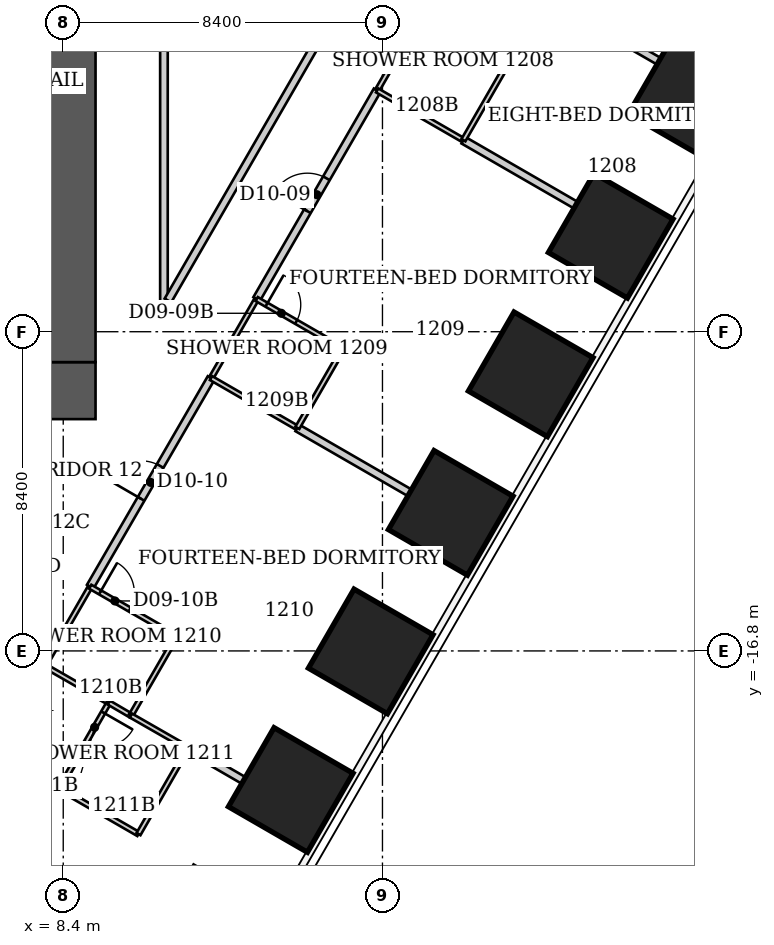
"""IFC4 building model, lengths in metres.
Left out: names, types, materials, properties, quantities, classifications, styles, units other than length and angle.
Written with IfcOpenShell. Run it as: python <this file> out.ifc"""

import sys

from ifc_helpers import new_model, si_unit, direction, frame, frame_2d, origin, origin_2d, place, context, subcontext, project, spatial, rectangle, extrude, clip, halfspace, element, fill, save


model = new_model("IFC4")
c1 = context("Model", 3, precision=1e-05, world=origin(), true_north=direction((0.0, 1.0)))
c2 = subcontext(c1, "Body", "Model", "MODEL_VIEW")
j1 = project(units=[si_unit("LENGTHUNIT", "METRE"), si_unit("PLANEANGLEUNIT", "RADIAN")], contexts=[c1])
p1 = place(None, origin())
s1 = spatial("IfcSite", under=j1, at=p1, CompositionType="ELEMENT")
p2 = place(p1, origin())
s2 = spatial("IfcBuilding", under=s1, at=p2, CompositionType="ELEMENT")
p3 = place(p2, frame((0.0, 0.0, 53.4)))
s3 = spatial("IfcBuildingStorey", under=s2, at=p3, CompositionType="ELEMENT", Elevation=53.4)
p4 = place(p3, frame((24.911, -2.23, 0.0), z_axis=(0.0, 0.0, 1.0), x_axis=(0.866025403784, -0.5, 0.0)))
e1 = element("IfcColumn", 1, at=p4, inside=s3, PredefinedType="COLUMN", context=c2, shape_type="SweptSolid", body=[
    clip(extrude(rectangle(XDim=2.4, YDim=2.4, at=origin_2d()), origin(), (0.0, 0.0, 1.0), 3.736), halfspace(frame((0.0, 0.0, 3.64)), False)),
])
p5 = place(p3, frame((22.806, -5.875, 0.0), z_axis=(0.0, 0.0, 1.0), x_axis=(0.866025403784, -0.5, 0.0)))
e2 = element("IfcColumn", 2, at=p5, inside=s3, PredefinedType="COLUMN", context=c2, shape_type="SweptSolid", body=[
    clip(extrude(rectangle(XDim=2.4, YDim=2.4, at=origin_2d()), origin(), (0.0, 0.0, 1.0), 3.744), halfspace(frame((0.0, 0.0, 3.64)), False)),
])
for number, where, z_axis, x_axis in (
    (3, (20.701, -9.521, 0.0), (0.0, 0.0, 1.0), (0.866, -0.5, 0.0)),
    (4, (18.596, -13.167, 0.0), (0.0, 0.0, 1.0), (0.866, -0.5, 0.0)),
):
    element("IfcColumn", number, at=place(p3, frame(where, z_axis=z_axis, x_axis=x_axis)), inside=s3, PredefinedType="COLUMN", context=c2, shape_type="SweptSolid", body=[
        clip(extrude(rectangle(XDim=2.4, YDim=2.4, at=origin_2d()), origin(), (0.0, 0.0, 1.0), 3.752), halfspace(frame((0.0, 0.0, 3.64)), False)),
    ])
p6 = place(p3, frame((16.491, -16.813, 0.0), z_axis=(0.0, 0.0, 1.0), x_axis=(0.866025403784, -0.5, 0.0)))
e5 = element("IfcColumn", 5, at=p6, inside=s3, PredefinedType="COLUMN", context=c2, shape_type="SweptSolid", body=[
    clip(extrude(rectangle(XDim=2.4, YDim=2.4, at=origin_2d()), origin(), (0.0, 0.0, 1.0), 3.744), halfspace(frame((0.0, 0.0, 3.64)), False)),
])
p7 = place(p3, frame((14.387, -20.459, 0.0), z_axis=(0.0, 0.0, 1.0), x_axis=(0.866025403784, -0.5, 0.0)))
e6 = element("IfcColumn", 6, at=p7, inside=s3, PredefinedType="COLUMN", context=c2, shape_type="SweptSolid", body=[
    clip(extrude(rectangle(XDim=2.4, YDim=2.4, at=origin_2d()), origin(), (0.0, 0.0, 1.0), 3.736), halfspace(frame((0.0, 0.0, 3.64)), False)),
])
p8 = place(p3, frame((-9.25, -9.95, 0.0), z_axis=(0.0, 0.0, 1.0), x_axis=(1.0, 0.0, 0.0)))
e7 = element("IfcWall", 7, at=p8, inside=s3, PredefinedType="SHEAR", context=c2, shape_type="SweptSolid", body=[
    extrude(rectangle(XDim=18.5, YDim=1.5, at=frame_2d((9.25, 0.0))), origin(), (0.0, 0.0, 1.0), 3.8),
])
p9 = place(p8, frame((2.137, 0.0, 0.0)))
e8 = element("IfcOpeningElement", 8, at=p9, cuts=e7, PredefinedType="OPENING", context=c2, shape_type="SweptSolid", body=[
    extrude(rectangle(XDim=1.1, YDim=2.1, at=frame_2d((0.55, 1.05))), frame((0.0, 0.75, 0.0), z_axis=(0.0, -1.0, 0.0), x_axis=(1.0, 0.0, 0.0)), (0.0, 0.0, 1.0), 1.5),
])
p10 = place(p8, frame((4.762, 0.0, 0.0)))
e9 = element("IfcOpeningElement", 9, at=p10, cuts=e7, PredefinedType="OPENING", context=c2, shape_type="SweptSolid", body=[
    extrude(rectangle(XDim=1.1, YDim=2.1, at=frame_2d((0.55, 1.05))), frame((0.0, 0.75, 0.0), z_axis=(0.0, -1.0, 0.0), x_axis=(1.0, 0.0, 0.0)), (0.0, 0.0, 1.0), 1.5),
])
p11 = place(p8, frame((7.387, 0.0, 0.0)))
e10 = element("IfcOpeningElement", 10, at=p11, cuts=e7, PredefinedType="OPENING", context=c2, shape_type="SweptSolid", body=[
    extrude(rectangle(XDim=1.1, YDim=2.1, at=frame_2d((0.55, 1.05))), frame((0.0, 0.75, 0.0), z_axis=(0.0, -1.0, 0.0), x_axis=(1.0, 0.0, 0.0)), (0.0, 0.0, 1.0), 1.5),
])
p12 = place(p3, frame((8.5, -9.2, 0.0), z_axis=(0.0, 0.0, 1.0), x_axis=(0.0, 1.0, 0.0)))
e11 = element("IfcWall", 11, at=p12, inside=s3, PredefinedType="SHEAR", context=c2, shape_type="SweptSolid", body=[
    extrude(rectangle(XDim=15.3, YDim=1.5, at=frame_2d((7.65, 0.0))), origin(), (0.0, 0.0, 1.0), 3.8),
])
p13 = place(p12, frame((10.7, 0.0, 0.0)))
e12 = element("IfcOpeningElement", 12, at=p13, cuts=e11, PredefinedType="OPENING", context=c2, shape_type="SweptSolid", body=[
    extrude(rectangle(XDim=1.2, YDim=2.2, at=frame_2d((0.6, 1.1))), frame((0.0, 0.75, 0.0), z_axis=(0.0, -1.0, 0.0), x_axis=(1.0, 0.0, 0.0)), (0.0, 0.0, 1.0), 1.5),
])
p14 = place(p3, frame((7.57, -21.86, 0.0), z_axis=(0.0, 0.0, 1.0), x_axis=(0.327706459026, -0.944779591605, 0.0)))
e13 = element("IfcWall", 13, at=p14, inside=s3, PredefinedType="PARTITIONING", context=c2, shape_type="SweptSolid", body=[
    extrude(rectangle(XDim=2.35, YDim=0.12, at=frame_2d((1.175, 0.0))), origin(), (0.0, 0.0, 1.0), 3.64),
])
p15 = place(p3, frame((7.91, -17.19, 0.0), z_axis=(0.0, 0.0, 1.0), x_axis=(0.499737123639, 0.866177122335, 0.0)))
e14 = element("IfcWall", 14, at=p15, inside=s3, PredefinedType="PARTITIONING", context=c2, shape_type="SweptSolid", body=[
    extrude(rectangle(XDim=2.401, YDim=0.12, at=frame_2d((1.201, 0.0))), origin(), (0.0, 0.0, 1.0), 3.64),
])
p16 = place(p3, frame((7.91, -17.19, 0.0), z_axis=(0.0, 0.0, 1.0), x_axis=(0.8673242112, -0.497743621421, 0.0)))
e15 = element("IfcWall", 15, at=p16, inside=s3, PredefinedType="PARTITIONING", context=c2, shape_type="SweptSolid", body=[
    extrude(rectangle(XDim=1.949, YDim=0.12, at=frame_2d((0.974, 0.0))), origin(), (0.0, 0.0, 1.0), 3.64),
])
p17 = place(p3, frame((8.3, -20.42, 0.0), z_axis=(0.0, 0.0, 1.0), x_axis=(0.866177122335, -0.499737123639, 0.0)))
e16 = element("IfcWall", 16, at=p17, inside=s3, PredefinedType="PARTITIONING", context=c2, shape_type="SweptSolid", body=[
    extrude(rectangle(XDim=2.401, YDim=0.12, at=frame_2d((1.201, 0.0))), origin(), (0.0, 0.0, 1.0), 3.64),
])
p18 = place(p3, frame((9.11, -15.11, 0.0), z_axis=(0.0, 0.0, 1.0), x_axis=(0.50119856319, 0.865332306259, 0.0)))
e17 = element("IfcWall", 17, at=p18, inside=s3, PredefinedType="PARTITIONING", context=c2, shape_type="SweptSolid", body=[
    extrude(rectangle(XDim=6.345, YDim=0.2, at=frame_2d((3.172, 0.0))), origin(), (0.0, 0.0, 1.0), 3.64),
])
p19 = place(p18, frame((2.672, 0.0, 0.0)))
e18 = element("IfcOpeningElement", 18, at=p19, cuts=e17, PredefinedType="OPENING", context=c2, shape_type="SweptSolid", body=[
    extrude(rectangle(XDim=1.0, YDim=2.13, at=frame_2d((0.5, 1.065))), frame((0.0, 0.1, 0.0), z_axis=(0.0, -1.0, 0.0), x_axis=(1.0, 0.0, 0.0)), (0.0, 0.0, 1.0), 0.2),
])
p20 = place(p3, frame((9.6, -18.16, 0.0), z_axis=(0.0, 0.0, 1.0), x_axis=(-0.498627694264, -0.866816256489, 0.0)))
e19 = element("IfcWall", 19, at=p20, inside=s3, PredefinedType="PARTITIONING", context=c2, shape_type="SweptSolid", body=[
    extrude(rectangle(XDim=2.607, YDim=0.12, at=frame_2d((1.304, 0.0))), origin(), (0.0, 0.0, 1.0), 3.64),
])
p21 = place(p20, frame((0.3, 0.0, 0.0)))
e20 = element("IfcOpeningElement", 20, at=p21, cuts=e19, PredefinedType="OPENING", context=c2, shape_type="SweptSolid", body=[
    extrude(rectangle(XDim=0.9, YDim=2.03, at=frame_2d((0.45, 1.015))), frame((0.0, 0.06, 0.0), z_axis=(0.0, -1.0, 0.0), x_axis=(1.0, 0.0, 0.0)), (0.0, 0.0, 1.0), 0.12),
])
p22 = place(p3, frame((9.6, -18.16, 0.0), z_axis=(0.0, 0.0, 1.0), x_axis=(0.862577739272, -0.505924543497, 0.0)))
e21 = element("IfcWall", 21, at=p22, inside=s3, PredefinedType="PARTITIONING", context=c2, shape_type="SweptSolid", body=[
    extrude(rectangle(XDim=0.672, YDim=0.12, at=frame_2d((0.336, 0.0))), origin(), (0.0, 0.0, 1.0), 3.64),
])
p23 = place(p3, frame((10.18, -18.5, 0.0), z_axis=(0.0, 0.0, 1.0), x_axis=(0.499693115345, 0.866202511239, 0.0)))
e22 = element("IfcWall", 22, at=p23, inside=s3, PredefinedType="PARTITIONING", context=c2, shape_type="SweptSolid", body=[
    extrude(rectangle(XDim=2.401, YDim=0.12, at=frame_2d((1.201, 0.0))), origin(), (0.0, 0.0, 1.0), 3.64),
])
p24 = place(p3, frame((10.18, -18.5, 0.0), z_axis=(0.0, 0.0, 1.0), x_axis=(0.867564547129, -0.497324598794, 0.0)))
e23 = element("IfcWall", 23, at=p24, inside=s3, PredefinedType="PARTITIONING", context=c2, shape_type="SweptSolid", body=[
    extrude(rectangle(XDim=1.729, YDim=0.12, at=frame_2d((0.865, 0.0))), origin(), (0.0, 0.0, 1.0), 3.64),
])
p25 = place(p3, frame((10.38, -21.62, 0.0), z_axis=(0.0, 0.0, 1.0), x_axis=(0.498627694264, 0.866816256489, 0.0)))
e24 = element("IfcWall", 24, at=p25, inside=s3, PredefinedType="PARTITIONING", context=c2, shape_type="SweptSolid", body=[
    extrude(rectangle(XDim=2.607, YDim=0.12, at=frame_2d((1.304, 0.0))), origin(), (0.0, 0.0, 1.0), 3.64),
])
p26 = place(p3, frame((11.05, -7.76, 0.0), z_axis=(0.0, 0.0, 1.0), x_axis=(0.0, 1.0, 0.0)))
e25 = element("IfcWall", 25, at=p26, inside=s3, PredefinedType="PARTITIONING", context=c2, shape_type="SweptSolid", body=[
    extrude(rectangle(XDim=17.16, YDim=0.2, at=frame_2d((8.58, 0.0))), origin(), (0.0, 0.0, 1.0), 3.64),
])
p27 = place(p26, frame((8.03, 0.0, 0.0)))
e26 = element("IfcOpeningElement", 26, at=p27, cuts=e25, PredefinedType="OPENING", context=c2, shape_type="SweptSolid", body=[
    extrude(rectangle(XDim=1.1, YDim=2.2, at=frame_2d((0.55, 1.1))), frame((0.0, 0.1, 0.0), z_axis=(0.0, -1.0, 0.0), x_axis=(1.0, 0.0, 0.0)), (0.0, 0.0, 1.0), 0.2),
])
p28 = place(p3, frame((11.38, -16.42, 0.0), z_axis=(0.0, 0.0, 1.0), x_axis=(-0.866154567199, 0.49977621564, 0.0)))
e27 = element("IfcWall", 27, at=p28, inside=s3, PredefinedType="PARTITIONING", context=c2, shape_type="SweptSolid", body=[
    extrude(rectangle(XDim=2.621, YDim=0.12, at=frame_2d((1.311, 0.0))), origin(), (0.0, 0.0, 1.0), 2.878),
])
p29 = place(p28, frame((1.421, 0.0, 0.0)))
e28 = element("IfcOpeningElement", 28, at=p29, cuts=e27, PredefinedType="OPENING", context=c2, shape_type="SweptSolid", body=[
    extrude(rectangle(XDim=0.9, YDim=2.03, at=frame_2d((0.45, 1.015))), frame((0.0, 0.06, 0.0), z_axis=(0.0, -1.0, 0.0), x_axis=(1.0, 0.0, 0.0)), (0.0, 0.0, 1.0), 0.12),
])
p30 = place(p3, frame((11.68, -19.36, 0.0), z_axis=(0.0, 0.0, 1.0), x_axis=(0.865885444553, -0.500242338183, 0.0)))
e29 = element("IfcWall", 29, at=p30, inside=s3, PredefinedType="PARTITIONING", context=c2, shape_type="SweptSolid", body=[
    extrude(rectangle(XDim=4.038, YDim=0.2, at=frame_2d((2.019, 0.0))), origin(), (0.0, 0.0, 1.0), 3.64),
])
p31 = place(p3, frame((12.29, -9.62, 0.0), z_axis=(0.0, 0.0, 1.0), x_axis=(0.499693115345, 0.866202511239, 0.0)))
e30 = element("IfcWall", 30, at=p31, inside=s3, PredefinedType="PARTITIONING", context=c2, shape_type="SweptSolid", body=[
    extrude(rectangle(XDim=2.401, YDim=0.12, at=frame_2d((1.201, 0.0))), origin(), (0.0, 0.0, 1.0), 3.64),
])
p32 = place(p3, frame((12.29, -9.62, 0.0), z_axis=(0.0, 0.0, 1.0), x_axis=(0.865987003449, -0.500066505434, 0.0)))
e31 = element("IfcWall", 31, at=p32, inside=s3, PredefinedType="PARTITIONING", context=c2, shape_type="SweptSolid", body=[
    extrude(rectangle(XDim=2.621, YDim=0.12, at=frame_2d((1.311, 0.0))), origin(), (0.0, 0.0, 1.0), 3.038),
])
p33 = place(p3, frame((13.49, -7.54, 0.0), z_axis=(0.0, 0.0, 1.0), x_axis=(0.500032479136, 0.866006651134, 0.0)))
e32 = element("IfcWall", 32, at=p33, inside=s3, PredefinedType="PARTITIONING", context=c2, shape_type="SweptSolid", body=[
    extrude(rectangle(XDim=6.339, YDim=0.2, at=frame_2d((3.17, 0.0))), origin(), (0.0, 0.0, 1.0), 3.64),
])
p34 = place(p33, frame((2.67, 0.0, 0.0)))
e33 = element("IfcOpeningElement", 33, at=p34, cuts=e32, PredefinedType="OPENING", context=c2, shape_type="SweptSolid", body=[
    extrude(rectangle(XDim=1.0, YDim=2.13, at=frame_2d((0.5, 1.065))), frame((0.0, 0.1, 0.0), z_axis=(0.0, -1.0, 0.0), x_axis=(1.0, 0.0, 0.0)), (0.0, 0.0, 1.0), 0.2),
])
p35 = place(p3, frame((14.56, -10.931, 0.0), z_axis=(0.0, 0.0, 1.0), x_axis=(0.865995646508, -0.500051537573, 0.0)))
e34 = element("IfcWall", 34, at=p35, inside=s3, PredefinedType="PARTITIONING", context=c2, shape_type="SweptSolid", body=[
    extrude(rectangle(XDim=5.758, YDim=0.2, at=frame_2d((2.879, 0.0))), origin(), (0.0, 0.0, 1.0), 3.038),
])
p36 = place(p3, frame((14.56, -10.93, 0.0), z_axis=(0.0, 0.0, 1.0), x_axis=(0.499737123639, 0.866177122335, 0.0)))
e35 = element("IfcWall", 35, at=p36, inside=s3, PredefinedType="PARTITIONING", context=c2, shape_type="SweptSolid", body=[
    extrude(rectangle(XDim=2.401, YDim=0.12, at=frame_2d((1.201, 0.0))), origin(), (0.0, 0.0, 1.0), 3.64),
])
p37 = place(p3, frame((15.76, -8.85, 0.0), z_axis=(0.0, 0.0, 1.0), x_axis=(-0.866114241029, 0.499846097802, 0.0)))
e36 = element("IfcWall", 36, at=p37, inside=s3, PredefinedType="PARTITIONING", context=c2, shape_type="SweptSolid", body=[
    extrude(rectangle(XDim=2.621, YDim=0.12, at=frame_2d((1.311, 0.0))), origin(), (0.0, 0.0, 1.0), 3.64),
])
p38 = place(p37, frame((1.421, 0.0, 0.0)))
e37 = element("IfcOpeningElement", 37, at=p38, cuts=e36, PredefinedType="OPENING", context=c2, shape_type="SweptSolid", body=[
    extrude(rectangle(XDim=0.9, YDim=2.03, at=frame_2d((0.45, 1.015))), frame((0.0, 0.06, 0.0), z_axis=(0.0, -1.0, 0.0), x_axis=(1.0, 0.0, 0.0)), (0.0, 0.0, 1.0), 0.12),
])
p39 = place(p3, frame((16.66, -2.05, 0.0), z_axis=(0.0, 0.0, 1.0), x_axis=(0.499693115345, 0.866202511239, 0.0)))
e38 = element("IfcWall", 38, at=p39, inside=s3, PredefinedType="PARTITIONING", context=c2, shape_type="SweptSolid", body=[
    extrude(rectangle(XDim=2.401, YDim=0.12, at=frame_2d((1.201, 0.0))), origin(), (0.0, 0.0, 1.0), 3.64),
])
p40 = place(p3, frame((16.66, -2.05, 0.0), z_axis=(0.0, 0.0, 1.0), x_axis=(0.866010296064, -0.500026166427, 0.0)))
e39 = element("IfcWall", 39, at=p40, inside=s3, PredefinedType="PARTITIONING", context=c2, shape_type="SweptSolid", body=[
    extrude(rectangle(XDim=2.621, YDim=0.12, at=frame_2d((1.311, 0.0))), origin(), (0.0, 0.0, 1.0), 3.64),
])
p41 = place(p3, frame((18.45, 5.06, 0.0), z_axis=(0.0, 0.0, 1.0), x_axis=(-0.499910730718, -0.866076937294, 0.0)))
e40 = element("IfcWall", 40, at=p41, inside=s3, PredefinedType="PARTITIONING", context=c2, shape_type="SweptSolid", body=[
    extrude(rectangle(XDim=14.593, YDim=0.2, at=frame_2d((7.296, 0.0))), origin(), (0.0, 0.0, 1.0), 3.64),
])
p42 = place(p3, frame((18.93, -3.361, 0.0), z_axis=(0.0, 0.0, 1.0), x_axis=(0.865985044037, -0.500069898618, 0.0)))
e41 = element("IfcWall", 41, at=p42, inside=s3, PredefinedType="PARTITIONING", context=c2, shape_type="SweptSolid", body=[
    extrude(rectangle(XDim=5.758, YDim=0.2, at=frame_2d((2.879, 0.0))), origin(), (0.0, 0.0, 1.0), 3.64),
])
p43 = place(p3, frame((18.93, -3.36, 0.0), z_axis=(0.0, 0.0, 1.0), x_axis=(0.499693115345, 0.866202511239, 0.0)))
e42 = element("IfcWall", 42, at=p43, inside=s3, PredefinedType="PARTITIONING", context=c2, shape_type="SweptSolid", body=[
    extrude(rectangle(XDim=2.401, YDim=0.12, at=frame_2d((1.201, 0.0))), origin(), (0.0, 0.0, 1.0), 3.64),
])
p44 = place(p3, frame((20.13, -1.28, 0.0), z_axis=(0.0, 0.0, 1.0), x_axis=(-0.866114241029, 0.499846097802, 0.0)))
e43 = element("IfcWall", 43, at=p44, inside=s3, PredefinedType="PARTITIONING", context=c2, shape_type="SweptSolid", body=[
    extrude(rectangle(XDim=2.621, YDim=0.12, at=frame_2d((1.311, 0.0))), origin(), (0.0, 0.0, 1.0), 3.64),
])
p45 = place(p44, frame((1.421, 0.0, 0.0)))
e44 = element("IfcOpeningElement", 44, at=p45, cuts=e43, PredefinedType="OPENING", context=c2, shape_type="SweptSolid", body=[
    extrude(rectangle(XDim=0.9, YDim=2.03, at=frame_2d((0.45, 1.015))), frame((0.0, 0.06, 0.0), z_axis=(0.0, -1.0, 0.0), x_axis=(1.0, 0.0, 0.0)), (0.0, 0.0, 1.0), 0.12),
])
p46 = place(p3, frame((26.096, -2.45, 0.0), z_axis=(0.0, 0.0, 1.0), x_axis=(-0.865997946826, 0.500047553832, 0.0)))
e45 = element("IfcWall", 45, at=p46, inside=s3, PredefinedType="PARTITIONING", context=c2, shape_type="SweptSolid", body=[
    extrude(rectangle(XDim=8.364, YDim=0.2, at=frame_2d((4.182, 0.0))), origin(), (0.0, 0.0, 1.0), 3.64),
])
p47 = place(p34, origin())
e46 = element("IfcDoor", 46, at=p47, inside=s3, OperationType="SINGLE_SWING_LEFT", PredefinedType="DOOR", context=c2, shape_type="SweptSolid", body=[
    extrude(rectangle(XDim=1.0, YDim=2.13, at=frame_2d((0.5, 1.065))), frame((0.0, 0.025, 0.0), z_axis=(0.0, -1.0, 0.0), x_axis=(1.0, 0.0, 0.0)), (0.0, 0.0, 1.0), 0.05),
])
fill(e33, e46)
p48 = place(p38, origin())
e47 = element("IfcDoor", 47, at=p48, inside=s3, OperationType="SINGLE_SWING_RIGHT", PredefinedType="DOOR", context=c2, shape_type="SweptSolid", body=[
    extrude(rectangle(XDim=0.9, YDim=2.03, at=frame_2d((0.45, 1.015))), frame((0.0, 0.025, 0.0), z_axis=(0.0, -1.0, 0.0), x_axis=(1.0, 0.0, 0.0)), (0.0, 0.0, 1.0), 0.05),
])
fill(e37, e47)
p49 = place(p19, origin())
e48 = element("IfcDoor", 48, at=p49, inside=s3, OperationType="SINGLE_SWING_LEFT", PredefinedType="DOOR", context=c2, shape_type="SweptSolid", body=[
    extrude(rectangle(XDim=1.0, YDim=2.13, at=frame_2d((0.5, 1.065))), frame((0.0, 0.025, 0.0), z_axis=(0.0, -1.0, 0.0), x_axis=(1.0, 0.0, 0.0)), (0.0, 0.0, 1.0), 0.05),
])
fill(e18, e48)
p50 = place(p29, origin())
e49 = element("IfcDoor", 49, at=p50, inside=s3, OperationType="SINGLE_SWING_RIGHT", PredefinedType="DOOR", context=c2, shape_type="SweptSolid", body=[
    extrude(rectangle(XDim=0.9, YDim=2.03, at=frame_2d((0.45, 1.015))), frame((0.0, 0.025, 0.0), z_axis=(0.0, -1.0, 0.0), x_axis=(1.0, 0.0, 0.0)), (0.0, 0.0, 1.0), 0.05),
])
fill(e28, e49)
p51 = place(p21, origin())
e50 = element("IfcDoor", 50, at=p51, inside=s3, OperationType="SINGLE_SWING_LEFT", PredefinedType="DOOR", context=c2, shape_type="SweptSolid", body=[
    extrude(rectangle(XDim=0.9, YDim=2.03, at=frame_2d((0.45, 1.015))), frame((0.0, 0.025, 0.0), z_axis=(0.0, -1.0, 0.0), x_axis=(1.0, 0.0, 0.0)), (0.0, 0.0, 1.0), 0.05),
])
fill(e20, e50)
save(model, sys.argv[1])
